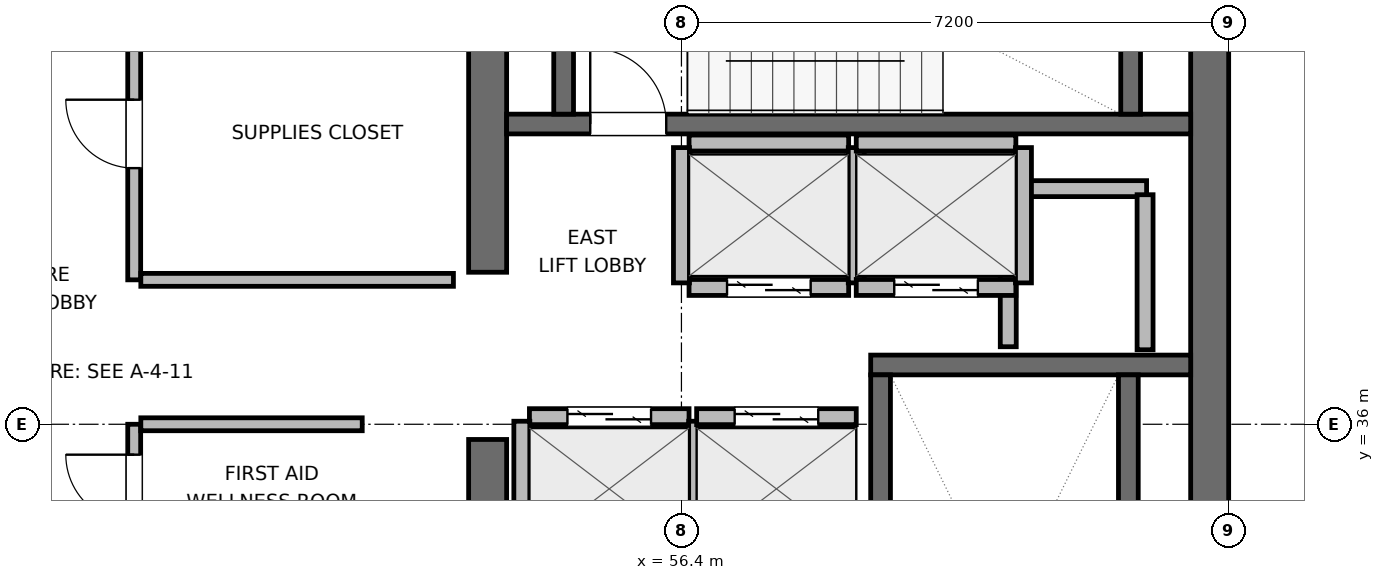
"""IFC4 building model, lengths in metres.
Left out: names, types, materials, properties, quantities, classifications, styles, units other than length and angle.
Written with IfcOpenShell. Run it as: python <this file> out.ifc"""

import sys

from ifc_helpers import new_model, si_unit, direction, frame, frame_2d, origin, place, context, subcontext, project, spatial, rectangle, extrude, element, fill, save


model = new_model("IFC4")
c1 = context("Model", 3, precision=1e-05, world=origin(), true_north=direction((0.0, 1.0)))
c2 = subcontext(c1, "Body", "Model", "MODEL_VIEW")
j1 = project(units=[si_unit("LENGTHUNIT", "METRE"), si_unit("PLANEANGLEUNIT", "RADIAN")], contexts=[c1])
p1 = place(None, origin())
s1 = spatial("IfcSite", under=j1, at=p1, CompositionType="ELEMENT")
p2 = place(p1, origin())
s2 = spatial("IfcBuilding", under=s1, at=p2, CompositionType="ELEMENT")
p3 = place(p2, frame((0.0, 0.0, 337.5)))
s3 = spatial("IfcBuildingStorey", under=s2, at=p3, CompositionType="ELEMENT", Elevation=337.5)
p4 = place(p3, frame((53.85, 27.85, 0.0), z_axis=(0.0, 0.0, 1.0), x_axis=(0.0, 1.0, 0.0)))
e1 = element("IfcWall", 1, at=p4, inside=s3, PredefinedType="SHEAR", context=c2, shape_type="SweptSolid", body=[
    extrude(rectangle(XDim=7.95, YDim=0.5, at=frame_2d((3.975, 0.0))), origin(), (0.0, 0.0, 1.0), 4.5),
])
p5 = place(p3, frame((53.85, 38.0, 0.0), z_axis=(0.0, 0.0, 1.0), x_axis=(0.0, 1.0, 0.0)))
e2 = element("IfcWall", 2, at=p5, inside=s3, PredefinedType="SHEAR", context=c2, shape_type="SweptSolid", body=[
    extrude(rectangle(XDim=6.15, YDim=0.5, at=frame_2d((3.075, 0.0))), origin(), (0.0, 0.0, 1.0), 4.5),
])
p6 = place(p3, frame((63.35, 27.6, 0.0), z_axis=(0.0, 0.0, 1.0), x_axis=(0.0, 1.0, 0.0)))
e3 = element("IfcWall", 3, at=p6, inside=s3, PredefinedType="SHEAR", context=c2, shape_type="SweptSolid", body=[
    extrude(rectangle(XDim=16.8, YDim=0.5, at=frame_2d((8.4, 0.0))), origin(), (0.0, 0.0, 1.0), 4.5),
])
p7 = place(p3, frame((58.89, 36.78, 0.0), z_axis=(0.0, 0.0, 1.0), x_axis=(1.0, 0.0, 0.0)))
e4 = element("IfcWall", 4, at=p7, inside=s3, PredefinedType="SHEAR", context=c2, shape_type="SweptSolid", body=[
    extrude(rectangle(XDim=4.21, YDim=0.26, at=frame_2d((2.105, 0.0))), origin(), (0.0, 0.0, 1.0), 4.5),
])
p8 = place(p3, frame((59.02, 29.05, 0.0), z_axis=(0.0, 0.0, 1.0), x_axis=(0.0, 1.0, 0.0)))
e5 = element("IfcWall", 5, at=p8, inside=s3, PredefinedType="SHEAR", context=c2, shape_type="SweptSolid", body=[
    extrude(rectangle(XDim=7.6, YDim=0.26, at=frame_2d((3.8, 0.0))), origin(), (0.0, 0.0, 1.0), 4.5),
])
p9 = place(p8, frame((0.3, 0.0, 0.0)))
e6 = element("IfcOpeningElement", 6, at=p9, cuts=e5, PredefinedType="OPENING", context=c2, shape_type="SweptSolid", body=[
    extrude(rectangle(XDim=1.0, YDim=2.04, at=frame_2d((0.5, 1.02))), frame((0.0, 0.14, 0.0), z_axis=(0.0, -1.0, 0.0), x_axis=(1.0, 0.0, 0.0)), (0.0, 0.0, 1.0), 0.28),
])
p10 = place(p3, frame((62.28, 29.05, 0.0), z_axis=(0.0, 0.0, 1.0), x_axis=(0.0, 1.0, 0.0)))
e7 = element("IfcWall", 7, at=p10, inside=s3, PredefinedType="SHEAR", context=c2, shape_type="SweptSolid", body=[
    extrude(rectangle(XDim=7.6, YDim=0.26, at=frame_2d((3.8, 0.0))), origin(), (0.0, 0.0, 1.0), 4.5),
])
p11 = place(p3, frame((54.1, 39.95, 0.0), z_axis=(0.0, 0.0, 1.0), x_axis=(1.0, 0.0, 0.0)))
e8 = element("IfcWall", 8, at=p11, inside=s3, PredefinedType="SHEAR", context=c2, shape_type="SweptSolid", body=[
    extrude(rectangle(XDim=9.0, YDim=0.26, at=frame_2d((4.5, 0.0))), origin(), (0.0, 0.0, 1.0), 4.5),
])
p12 = place(p11, frame((1.1, 0.0, 0.0)))
e9 = element("IfcOpeningElement", 9, at=p12, cuts=e8, PredefinedType="OPENING", context=c2, shape_type="SweptSolid", body=[
    extrude(rectangle(XDim=1.0, YDim=2.04, at=frame_2d((0.5, 1.02))), frame((0.0, 0.14, 0.0), z_axis=(0.0, -1.0, 0.0), x_axis=(1.0, 0.0, 0.0)), (0.0, 0.0, 1.0), 0.28),
])
for number, where, z_axis, x_axis in (
    (10, (54.85, 40.08, 0.0), (0.0, 0.0, 1.0), (0.0, 1.0, 0.0)),
    (11, (62.31, 40.08, 0.0), (0.0, 0.0, 1.0), (0.0, 1.0, 0.0)),
):
    element("IfcWall", number, at=place(p3, frame(where, z_axis=z_axis, x_axis=x_axis)), inside=s3, PredefinedType="SHEAR", context=c2, shape_type="SweptSolid", body=[
        extrude(rectangle(XDim=2.94, YDim=0.26, at=frame_2d((1.47, 0.0))), origin(), (0.0, 0.0, 1.0), 4.5),
    ])
p13 = place(p3, frame((60.72, 39.1, 0.0), z_axis=(0.0, 0.0, 1.0), x_axis=(1.0, 0.0, 0.0)))
e12 = element("IfcWall", 12, at=p13, inside=s3, PredefinedType="PARTITIONING", context=c2, shape_type="SweptSolid", body=[
    extrude(rectangle(XDim=1.8, YDim=0.21, at=frame_2d((0.9, 0.0))), origin(), (0.0, 0.0, 1.0), 4.28),
])
p14 = place(p3, frame((60.7, 37.02, 0.0), z_axis=(0.0, 0.0, 1.0), x_axis=(0.0, 1.0, 0.0)))
e13 = element("IfcWall", 13, at=p14, inside=s3, PredefinedType="PARTITIONING", context=c2, shape_type="SweptSolid", body=[
    extrude(rectangle(XDim=1.96, YDim=0.21, at=frame_2d((0.98, 0.0))), origin(), (0.0, 0.0, 1.0), 4.28),
])
p15 = place(p3, frame((62.5, 36.98, 0.0), z_axis=(0.0, 0.0, 1.0), x_axis=(0.0, 1.0, 0.0)))
e14 = element("IfcWall", 14, at=p15, inside=s3, PredefinedType="PARTITIONING", context=c2, shape_type="SweptSolid", body=[
    extrude(rectangle(XDim=2.04, YDim=0.21, at=frame_2d((1.02, 0.0))), origin(), (0.0, 0.0, 1.0), 4.28),
])
p16 = place(p3, frame((54.4, 36.1, 0.0), z_axis=(0.0, 0.0, 1.0), x_axis=(1.0, 0.0, 0.0)))
e15 = element("IfcWall", 15, at=p16, inside=s3, PredefinedType="PARTITIONING", context=c2, shape_type="SweptSolid", body=[
    extrude(rectangle(XDim=2.1, YDim=0.21, at=frame_2d((1.05, 0.0))), origin(), (0.0, 0.0, 1.0), 4.28),
])
p17 = place(p16, frame((0.5, 0.0, 0.0)))
e16 = element("IfcOpeningElement", 16, at=p17, cuts=e15, PredefinedType="OPENING", context=c2, shape_type="SweptSolid", body=[
    extrude(rectangle(XDim=1.1, YDim=2.04, at=frame_2d((0.55, 1.02))), frame((0.0, 0.115, 0.0), z_axis=(0.0, -1.0, 0.0), x_axis=(1.0, 0.0, 0.0)), (0.0, 0.0, 1.0), 0.23),
])
for number, where, z_axis, x_axis in (
    (17, (54.3, 34.26, 0.0), (0.0, 0.0, 1.0), (0.0, 1.0, 0.0)),
    (18, (56.6, 34.26, 0.0), (0.0, 0.0, 1.0), (0.0, 1.0, 0.0)),
):
    element("IfcWall", number, at=place(p3, frame(where, z_axis=z_axis, x_axis=x_axis)), inside=s3, PredefinedType="PARTITIONING", context=c2, shape_type="SweptSolid", body=[
        extrude(rectangle(XDim=1.78, YDim=0.21, at=frame_2d((0.89, 0.0))), origin(), (0.0, 0.0, 1.0), 4.28),
    ])
p18 = place(p3, frame((56.6, 36.1, 0.0), z_axis=(0.0, 0.0, 1.0), x_axis=(1.0, 0.0, 0.0)))
e19 = element("IfcWall", 19, at=p18, inside=s3, PredefinedType="PARTITIONING", context=c2, shape_type="SweptSolid", body=[
    extrude(rectangle(XDim=2.1, YDim=0.21, at=frame_2d((1.05, 0.0))), origin(), (0.0, 0.0, 1.0), 4.28),
])
p19 = place(p18, frame((0.5, 0.0, 0.0)))
e20 = element("IfcOpeningElement", 20, at=p19, cuts=e19, PredefinedType="OPENING", context=c2, shape_type="SweptSolid", body=[
    extrude(rectangle(XDim=1.1, YDim=2.04, at=frame_2d((0.55, 1.02))), frame((0.0, 0.115, 0.0), z_axis=(0.0, -1.0, 0.0), x_axis=(1.0, 0.0, 0.0)), (0.0, 0.0, 1.0), 0.23),
])
p20 = place(p3, frame((56.5, 37.8, 0.0), z_axis=(0.0, 0.0, 1.0), x_axis=(1.0, 0.0, 0.0)))
e21 = element("IfcWall", 21, at=p20, inside=s3, PredefinedType="PARTITIONING", context=c2, shape_type="SweptSolid", body=[
    extrude(rectangle(XDim=2.1, YDim=0.21, at=frame_2d((1.05, 0.0))), origin(), (0.0, 0.0, 1.0), 4.28),
])
p21 = place(p20, frame((0.5, 0.0, 0.0)))
e22 = element("IfcOpeningElement", 22, at=p21, cuts=e21, PredefinedType="OPENING", context=c2, shape_type="SweptSolid", body=[
    extrude(rectangle(XDim=1.1, YDim=2.04, at=frame_2d((0.55, 1.02))), frame((0.0, 0.115, 0.0), z_axis=(0.0, -1.0, 0.0), x_axis=(1.0, 0.0, 0.0)), (0.0, 0.0, 1.0), 0.23),
])
p22 = place(p3, frame((56.5, 39.7, 0.0), z_axis=(0.0, 0.0, 1.0), x_axis=(1.0, 0.0, 0.0)))
e23 = element("IfcWall", 23, at=p22, inside=s3, PredefinedType="PARTITIONING", context=c2, shape_type="SweptSolid", body=[
    extrude(rectangle(XDim=2.1, YDim=0.21, at=frame_2d((1.05, 0.0))), origin(), (0.0, 0.0, 1.0), 4.28),
])
for number, where, z_axis, x_axis in (
    (24, (56.4, 37.86, 0.0), (0.0, 0.0, 1.0), (0.0, 1.0, 0.0)),
    (25, (58.7, 37.86, 0.0), (0.0, 0.0, 1.0), (0.0, 1.0, 0.0)),
):
    element("IfcWall", number, at=place(p3, frame(where, z_axis=z_axis, x_axis=x_axis)), inside=s3, PredefinedType="PARTITIONING", context=c2, shape_type="SweptSolid", body=[
        extrude(rectangle(XDim=1.78, YDim=0.21, at=frame_2d((0.89, 0.0))), origin(), (0.0, 0.0, 1.0), 4.28),
    ])
p23 = place(p3, frame((58.7, 37.8, 0.0), z_axis=(0.0, 0.0, 1.0), x_axis=(1.0, 0.0, 0.0)))
e26 = element("IfcWall", 26, at=p23, inside=s3, PredefinedType="PARTITIONING", context=c2, shape_type="SweptSolid", body=[
    extrude(rectangle(XDim=2.1, YDim=0.21, at=frame_2d((1.05, 0.0))), origin(), (0.0, 0.0, 1.0), 4.28),
])
p24 = place(p23, frame((0.5, 0.0, 0.0)))
e27 = element("IfcOpeningElement", 27, at=p24, cuts=e26, PredefinedType="OPENING", context=c2, shape_type="SweptSolid", body=[
    extrude(rectangle(XDim=1.1, YDim=2.04, at=frame_2d((0.55, 1.02))), frame((0.0, 0.115, 0.0), z_axis=(0.0, -1.0, 0.0), x_axis=(1.0, 0.0, 0.0)), (0.0, 0.0, 1.0), 0.23),
])
p25 = place(p3, frame((58.7, 39.7, 0.0), z_axis=(0.0, 0.0, 1.0), x_axis=(1.0, 0.0, 0.0)))
e28 = element("IfcWall", 28, at=p25, inside=s3, PredefinedType="PARTITIONING", context=c2, shape_type="SweptSolid", body=[
    extrude(rectangle(XDim=2.1, YDim=0.21, at=frame_2d((1.05, 0.0))), origin(), (0.0, 0.0, 1.0), 4.28),
])
p26 = place(p3, frame((60.9, 37.86, 0.0), z_axis=(0.0, 0.0, 1.0), x_axis=(0.0, 1.0, 0.0)))
e29 = element("IfcWall", 29, at=p26, inside=s3, PredefinedType="PARTITIONING", context=c2, shape_type="SweptSolid", body=[
    extrude(rectangle(XDim=1.78, YDim=0.21, at=frame_2d((0.89, 0.0))), origin(), (0.0, 0.0, 1.0), 4.28),
])
p27 = place(p3, frame((49.2, 32.6, 0.0), z_axis=(0.0, 0.0, 1.0), x_axis=(0.0, 1.0, 0.0)))
e30 = element("IfcWall", 30, at=p27, inside=s3, PredefinedType="PARTITIONING", context=c2, shape_type="SweptSolid", body=[
    extrude(rectangle(XDim=3.4, YDim=0.17, at=frame_2d((1.7, 0.0))), origin(), (0.0, 0.0, 1.0), 4.28),
])
p28 = place(p27, frame((0.4, 0.0, 0.0)))
e31 = element("IfcOpeningElement", 31, at=p28, cuts=e30, PredefinedType="OPENING", context=c2, shape_type="SweptSolid", body=[
    extrude(rectangle(XDim=0.9, YDim=2.02, at=frame_2d((0.45, 1.01))), frame((0.0, 0.095, 0.0), z_axis=(0.0, -1.0, 0.0), x_axis=(1.0, 0.0, 0.0)), (0.0, 0.0, 1.0), 0.19),
])
p29 = place(p27, frame((2.1, 0.0, 0.0)))
e32 = element("IfcOpeningElement", 32, at=p29, cuts=e30, PredefinedType="OPENING", context=c2, shape_type="SweptSolid", body=[
    extrude(rectangle(XDim=0.9, YDim=2.02, at=frame_2d((0.45, 1.01))), frame((0.0, 0.095, 0.0), z_axis=(0.0, -1.0, 0.0), x_axis=(1.0, 0.0, 0.0)), (0.0, 0.0, 1.0), 0.19),
])
p30 = place(p3, frame((49.287, 36.0, 0.0), z_axis=(0.0, 0.0, 1.0), x_axis=(1.0, 0.0, 0.0)))
e33 = element("IfcWall", 33, at=p30, inside=s3, PredefinedType="PARTITIONING", context=c2, shape_type="SweptSolid", body=[
    extrude(rectangle(XDim=2.913, YDim=0.17, at=frame_2d((1.457, 0.0))), origin(), (0.0, 0.0, 1.0), 4.28),
])
p31 = place(p3, frame((49.2, 37.9, 0.0), z_axis=(0.0, 0.0, 1.0), x_axis=(0.0, 1.0, 0.0)))
e34 = element("IfcWall", 34, at=p31, inside=s3, PredefinedType="PARTITIONING", context=c2, shape_type="SweptSolid", body=[
    extrude(rectangle(XDim=6.0, YDim=0.17, at=frame_2d((3.0, 0.0))), origin(), (0.0, 0.0, 1.0), 4.28),
])
p32 = place(p31, frame((1.47, 0.0, 0.0)))
e35 = element("IfcOpeningElement", 35, at=p32, cuts=e34, PredefinedType="OPENING", context=c2, shape_type="SweptSolid", body=[
    extrude(rectangle(XDim=0.9, YDim=2.02, at=frame_2d((0.45, 1.01))), frame((0.0, 0.095, 0.0), z_axis=(0.0, -1.0, 0.0), x_axis=(1.0, 0.0, 0.0)), (0.0, 0.0, 1.0), 0.19),
])
p33 = place(p31, frame((4.47, 0.0, 0.0)))
e36 = element("IfcOpeningElement", 36, at=p33, cuts=e34, PredefinedType="OPENING", context=c2, shape_type="SweptSolid", body=[
    extrude(rectangle(XDim=0.9, YDim=2.02, at=frame_2d((0.45, 1.01))), frame((0.0, 0.095, 0.0), z_axis=(0.0, -1.0, 0.0), x_axis=(1.0, 0.0, 0.0)), (0.0, 0.0, 1.0), 0.19),
])
p34 = place(p3, frame((49.287, 37.9, 0.0), z_axis=(0.0, 0.0, 1.0), x_axis=(1.0, 0.0, 0.0)))
e37 = element("IfcWall", 37, at=p34, inside=s3, PredefinedType="PARTITIONING", context=c2, shape_type="SweptSolid", body=[
    extrude(rectangle(XDim=4.113, YDim=0.17, at=frame_2d((2.056, 0.0))), origin(), (0.0, 0.0, 1.0), 4.28),
])
p35 = place(p12, origin())
e38 = element("IfcDoor", 38, at=p35, inside=s3, OperationType="SINGLE_SWING_LEFT", PredefinedType="DOOR", context=c2, shape_type="SweptSolid", body=[
    extrude(rectangle(XDim=1.0, YDim=2.04, at=frame_2d((0.5, 1.02))), frame((0.0, 0.025, 0.0), z_axis=(0.0, -1.0, 0.0), x_axis=(1.0, 0.0, 0.0)), (0.0, 0.0, 1.0), 0.05),
])
fill(e9, e38)
p36 = place(p17, origin())
e39 = element("IfcDoor", 39, at=p36, inside=s3, OperationType="DOUBLE_DOOR_SLIDING", PredefinedType="DOOR", context=c2, shape_type="SweptSolid", body=[
    extrude(rectangle(XDim=1.1, YDim=2.04, at=frame_2d((0.55, 1.02))), frame((0.0, 0.025, 0.0), z_axis=(0.0, -1.0, 0.0), x_axis=(1.0, 0.0, 0.0)), (0.0, 0.0, 1.0), 0.05),
])
fill(e16, e39)
p37 = place(p19, origin())
e40 = element("IfcDoor", 40, at=p37, inside=s3, OperationType="DOUBLE_DOOR_SLIDING", PredefinedType="DOOR", context=c2, shape_type="SweptSolid", body=[
    extrude(rectangle(XDim=1.1, YDim=2.04, at=frame_2d((0.55, 1.02))), frame((0.0, 0.025, 0.0), z_axis=(0.0, -1.0, 0.0), x_axis=(1.0, 0.0, 0.0)), (0.0, 0.0, 1.0), 0.05),
])
fill(e20, e40)
p38 = place(p21, origin())
e41 = element("IfcDoor", 41, at=p38, inside=s3, OperationType="DOUBLE_DOOR_SLIDING", PredefinedType="DOOR", context=c2, shape_type="SweptSolid", body=[
    extrude(rectangle(XDim=1.1, YDim=2.04, at=frame_2d((0.55, 1.02))), frame((0.0, 0.025, 0.0), z_axis=(0.0, -1.0, 0.0), x_axis=(1.0, 0.0, 0.0)), (0.0, 0.0, 1.0), 0.05),
])
fill(e22, e41)
p39 = place(p24, origin())
e42 = element("IfcDoor", 42, at=p39, inside=s3, OperationType="DOUBLE_DOOR_SLIDING", PredefinedType="DOOR", context=c2, shape_type="SweptSolid", body=[
    extrude(rectangle(XDim=1.1, YDim=2.04, at=frame_2d((0.55, 1.02))), frame((0.0, 0.025, 0.0), z_axis=(0.0, -1.0, 0.0), x_axis=(1.0, 0.0, 0.0)), (0.0, 0.0, 1.0), 0.05),
])
fill(e27, e42)
p40 = place(p29, origin())
e43 = element("IfcDoor", 43, at=p40, inside=s3, OperationType="SINGLE_SWING_RIGHT", PredefinedType="DOOR", context=c2, shape_type="SweptSolid", body=[
    extrude(rectangle(XDim=0.9, YDim=2.02, at=frame_2d((0.45, 1.01))), frame((0.0, 0.025, 0.0), z_axis=(0.0, -1.0, 0.0), x_axis=(1.0, 0.0, 0.0)), (0.0, 0.0, 1.0), 0.05),
])
fill(e32, e43)
p41 = place(p32, origin())
e44 = element("IfcDoor", 44, at=p41, inside=s3, OperationType="SINGLE_SWING_RIGHT", PredefinedType="DOOR", context=c2, shape_type="SweptSolid", body=[
    extrude(rectangle(XDim=0.9, YDim=2.02, at=frame_2d((0.45, 1.01))), frame((0.0, 0.025, 0.0), z_axis=(0.0, -1.0, 0.0), x_axis=(1.0, 0.0, 0.0)), (0.0, 0.0, 1.0), 0.05),
])
fill(e35, e44)
save(model, sys.argv[1])
